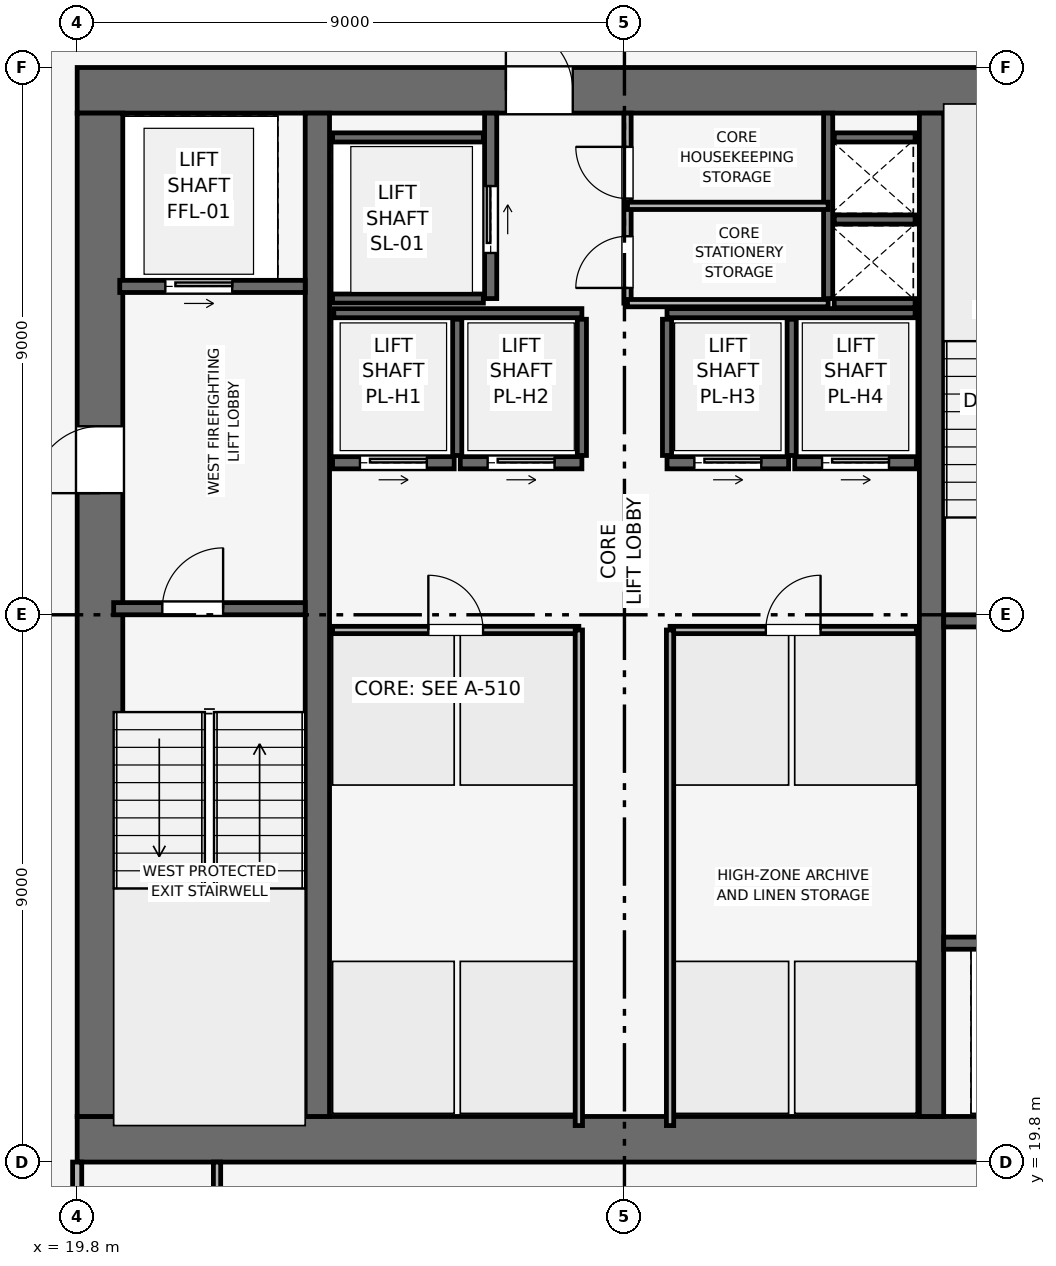
"""IFC4 building model, lengths in metres.
Left out: names, types, materials, properties, quantities, classifications, styles, units other than length and angle.
Written with IfcOpenShell. Run it as: python <this file> out.ifc"""

import sys

from ifc_helpers import new_model, si_unit, direction, frame, frame_2d, origin, place, context, subcontext, project, spatial, rectangle, extrude, element, fill, save


model = new_model("IFC4")
c1 = context("Model", 3, precision=1e-05, world=origin(), true_north=direction((0.0, 1.0)))
c2 = subcontext(c1, "Body", "Model", "MODEL_VIEW")
j1 = project(units=[si_unit("LENGTHUNIT", "METRE"), si_unit("PLANEANGLEUNIT", "RADIAN")], contexts=[c1])
p1 = place(None, origin())
s1 = spatial("IfcSite", under=j1, at=p1, CompositionType="ELEMENT")
p2 = place(p1, origin())
s2 = spatial("IfcBuilding", under=s1, at=p2, CompositionType="ELEMENT")
p3 = place(p2, frame((0.0, 0.0, 269.1)))
s3 = spatial("IfcBuildingStorey", under=s2, at=p3, CompositionType="ELEMENT", Elevation=269.1)
p4 = place(p3, frame((19.8, 20.175, 0.0), z_axis=(0.0, 0.0, 1.0), x_axis=(1.0, 0.0, 0.0)))
e1 = element("IfcWall", 1, at=p4, inside=s3, PredefinedType="SHEAR", context=c2, shape_type="SweptSolid", body=[
    extrude(rectangle(XDim=18.0, YDim=0.75, at=frame_2d((9.0, 0.0))), origin(), (0.0, 0.0, 1.0), 3.75),
])
p5 = place(p3, frame((19.8, 37.425, 0.0), z_axis=(0.0, 0.0, 1.0), x_axis=(1.0, 0.0, 0.0)))
e2 = element("IfcWall", 2, at=p5, inside=s3, PredefinedType="SHEAR", context=c2, shape_type="SweptSolid", body=[
    extrude(rectangle(XDim=18.0, YDim=0.75, at=frame_2d((9.0, 0.0))), origin(), (0.0, 0.0, 1.0), 3.75),
])
p6 = place(p5, frame((7.05, 0.0, 0.0)))
e3 = element("IfcOpeningElement", 3, at=p6, cuts=e2, PredefinedType="OPENING", context=c2, shape_type="SweptSolid", body=[
    extrude(rectangle(XDim=1.1, YDim=2.15, at=frame_2d((0.55, 1.075))), frame((0.0, 0.385, 0.0), z_axis=(0.0, -1.0, 0.0), x_axis=(1.0, 0.0, 0.0)), (0.0, 0.0, 1.0), 0.77),
])
p7 = place(p3, frame((20.175, 20.55, 0.0), z_axis=(0.0, 0.0, 1.0), x_axis=(0.0, 1.0, 0.0)))
e4 = element("IfcWall", 4, at=p7, inside=s3, PredefinedType="SHEAR", context=c2, shape_type="SweptSolid", body=[
    extrude(rectangle(XDim=16.5, YDim=0.75, at=frame_2d((8.25, 0.0))), origin(), (0.0, 0.0, 1.0), 3.75),
])
p8 = place(p7, frame((10.25, 0.0, 0.0)))
e5 = element("IfcOpeningElement", 5, at=p8, cuts=e4, PredefinedType="OPENING", context=c2, shape_type="SweptSolid", body=[
    extrude(rectangle(XDim=1.1, YDim=2.15, at=frame_2d((0.55, 1.075))), frame((0.0, 0.385, 0.0), z_axis=(0.0, -1.0, 0.0), x_axis=(1.0, 0.0, 0.0)), (0.0, 0.0, 1.0), 0.77),
])
for number, where, z_axis, x_axis in (
    (6, (23.75, 20.55, 0.0), (0.0, 0.0, 1.0), (0.0, 1.0, 0.0)),
    (7, (33.85, 20.55, 0.0), (0.0, 0.0, 1.0), (0.0, 1.0, 0.0)),
):
    element("IfcWall", number, at=place(p3, frame(where, z_axis=z_axis, x_axis=x_axis)), inside=s3, PredefinedType="SHEAR", context=c2, shape_type="SweptSolid", body=[
        extrude(rectangle(XDim=16.5, YDim=0.4, at=frame_2d((8.25, 0.0))), origin(), (0.0, 0.0, 1.0), 3.75),
    ])
p9 = place(p3, frame((20.4, 28.9, 0.0), z_axis=(0.0, 0.0, 1.0), x_axis=(1.0, 0.0, 0.0)))
e8 = element("IfcWall", 8, at=p9, inside=s3, PredefinedType="SHEAR", context=c2, shape_type="SweptSolid", body=[
    extrude(rectangle(XDim=3.15, YDim=0.2, at=frame_2d((1.575, 0.0))), origin(), (0.0, 0.0, 1.0), 3.5),
])
p10 = place(p9, frame((0.8, 0.0, 0.0)))
e9 = element("IfcOpeningElement", 9, at=p10, cuts=e8, PredefinedType="OPENING", context=c2, shape_type="SweptSolid", body=[
    extrude(rectangle(XDim=1.0, YDim=2.1, at=frame_2d((0.5, 1.05))), frame((0.0, 0.11, 0.0), z_axis=(0.0, -1.0, 0.0), x_axis=(1.0, 0.0, 0.0)), (0.0, 0.0, 1.0), 0.22),
])
p11 = place(p3, frame((34.05, 28.7, 0.0), z_axis=(0.0, 0.0, 1.0), x_axis=(1.0, 0.0, 0.0)))
e10 = element("IfcWall", 10, at=p11, inside=s3, PredefinedType="SHEAR", context=c2, shape_type="SweptSolid", body=[
    extrude(rectangle(XDim=3.15, YDim=0.2, at=frame_2d((1.575, 0.0))), origin(), (0.0, 0.0, 1.0), 3.5),
])
p12 = place(p11, frame((0.8, 0.0, 0.0)))
e11 = element("IfcOpeningElement", 11, at=p12, cuts=e10, PredefinedType="OPENING", context=c2, shape_type="SweptSolid", body=[
    extrude(rectangle(XDim=1.0, YDim=2.1, at=frame_2d((0.5, 1.05))), frame((0.0, 0.11, 0.0), z_axis=(0.0, -1.0, 0.0), x_axis=(1.0, 0.0, 0.0)), (0.0, 0.0, 1.0), 0.22),
])
p13 = place(p3, frame((32.15, 34.0, 0.0), z_axis=(0.0, 0.0, 1.0), x_axis=(0.0, 1.0, 0.0)))
e12 = element("IfcWall", 12, at=p13, inside=s3, PredefinedType="SHEAR", context=c2, shape_type="SweptSolid", body=[
    extrude(rectangle(XDim=3.05, YDim=0.15, at=frame_2d((1.525, 0.0))), origin(), (0.0, 0.0, 1.0), 3.5),
])
for number, where, z_axis, x_axis in (
    (13, (32.25, 33.925, 0.0), (0.0, 0.0, 1.0), (1.0, 0.0, 0.0)),
    (14, (32.25, 35.3, 0.0), (0.0, 0.0, 1.0), (1.0, 0.0, 0.0)),
):
    element("IfcWall", number, at=place(p3, frame(where, z_axis=z_axis, x_axis=x_axis)), inside=s3, PredefinedType="SHEAR", context=c2, shape_type="SweptSolid", body=[
        extrude(rectangle(XDim=1.33, YDim=0.15, at=frame_2d((0.665, 0.0))), origin(), (0.0, 0.0, 1.0), 3.5),
    ])
p14 = place(p3, frame((20.5, 34.2, 0.0), z_axis=(0.0, 0.0, 1.0), x_axis=(1.0, 0.0, 0.0)))
e15 = element("IfcWall", 15, at=p14, inside=s3, PredefinedType="SHEAR", context=c2, shape_type="SweptSolid", body=[
    extrude(rectangle(XDim=3.05, YDim=0.2, at=frame_2d((1.525, 0.0))), origin(), (0.0, 0.0, 1.0), 3.5),
])
p15 = place(p14, frame((0.75, 0.0, 0.0)))
e16 = element("IfcOpeningElement", 16, at=p15, cuts=e15, PredefinedType="OPENING", context=c2, shape_type="SweptSolid", body=[
    extrude(rectangle(XDim=1.1, YDim=2.15, at=frame_2d((0.55, 1.075))), frame((0.0, 0.11, 0.0), z_axis=(0.0, -1.0, 0.0), x_axis=(1.0, 0.0, 0.0)), (0.0, 0.0, 1.0), 0.22),
])
p16 = place(p3, frame((34.05, 23.4, 0.0), z_axis=(0.0, 0.0, 1.0), x_axis=(1.0, 0.0, 0.0)))
e17 = element("IfcWall", 17, at=p16, inside=s3, PredefinedType="SHEAR", context=c2, shape_type="SweptSolid", body=[
    extrude(rectangle(XDim=3.05, YDim=0.2, at=frame_2d((1.525, 0.0))), origin(), (0.0, 0.0, 1.0), 3.5),
])
p17 = place(p16, frame((1.2, 0.0, 0.0)))
e18 = element("IfcOpeningElement", 18, at=p17, cuts=e17, PredefinedType="OPENING", context=c2, shape_type="SweptSolid", body=[
    extrude(rectangle(XDim=1.1, YDim=2.15, at=frame_2d((0.55, 1.075))), frame((0.0, 0.11, 0.0), z_axis=(0.0, -1.0, 0.0), x_axis=(1.0, 0.0, 0.0)), (0.0, 0.0, 1.0), 0.22),
])
p18 = place(p3, frame((26.6, 34.0, 0.0), z_axis=(0.0, 0.0, 1.0), x_axis=(0.0, 1.0, 0.0)))
e19 = element("IfcWall", 19, at=p18, inside=s3, PredefinedType="SHEAR", context=c2, shape_type="SweptSolid", body=[
    extrude(rectangle(XDim=3.05, YDim=0.2, at=frame_2d((1.525, 0.0))), origin(), (0.0, 0.0, 1.0), 3.5),
])
p19 = place(p18, frame((0.75, 0.0, 0.0)))
e20 = element("IfcOpeningElement", 20, at=p19, cuts=e19, PredefinedType="OPENING", context=c2, shape_type="SweptSolid", body=[
    extrude(rectangle(XDim=1.1, YDim=2.15, at=frame_2d((0.55, 1.075))), frame((0.0, 0.11, 0.0), z_axis=(0.0, -1.0, 0.0), x_axis=(1.0, 0.0, 0.0)), (0.0, 0.0, 1.0), 0.22),
])
for number, where, z_axis, x_axis in (
    (21, (24.0, 34.0, 0.0), (0.0, 0.0, 1.0), (1.0, 0.0, 0.0)),
    (22, (24.0, 36.65, 0.0), (0.0, 0.0, 1.0), (1.0, 0.0, 0.0)),
):
    element("IfcWall", number, at=place(p3, frame(where, z_axis=z_axis, x_axis=x_axis)), inside=s3, PredefinedType="SHEAR", context=c2, shape_type="SweptSolid", body=[
        extrude(rectangle(XDim=2.48, YDim=0.15, at=frame_2d((1.24, 0.0))), origin(), (0.0, 0.0, 1.0), 3.5),
    ])
p20 = place(p3, frame((24.0, 31.3, 0.0), z_axis=(0.0, 0.0, 1.0), x_axis=(1.0, 0.0, 0.0)))
e23 = element("IfcWall", 23, at=p20, inside=s3, PredefinedType="SHEAR", context=c2, shape_type="SweptSolid", body=[
    extrude(rectangle(XDim=2.0, YDim=0.2, at=frame_2d((1.0, 0.0))), origin(), (0.0, 0.0, 1.0), 3.5),
])
p21 = place(p20, frame((0.45, 0.0, 0.0)))
e24 = element("IfcOpeningElement", 24, at=p21, cuts=e23, PredefinedType="OPENING", context=c2, shape_type="SweptSolid", body=[
    extrude(rectangle(XDim=1.1, YDim=2.15, at=frame_2d((0.55, 1.075))), frame((0.0, 0.11, 0.0), z_axis=(0.0, -1.0, 0.0), x_axis=(1.0, 0.0, 0.0)), (0.0, 0.0, 1.0), 0.22),
])
p22 = place(p3, frame((26.1, 31.3, 0.0), z_axis=(0.0, 0.0, 1.0), x_axis=(1.0, 0.0, 0.0)))
e25 = element("IfcWall", 25, at=p22, inside=s3, PredefinedType="SHEAR", context=c2, shape_type="SweptSolid", body=[
    extrude(rectangle(XDim=2.0, YDim=0.2, at=frame_2d((1.0, 0.0))), origin(), (0.0, 0.0, 1.0), 3.5),
])
p23 = place(p22, frame((0.45, 0.0, 0.0)))
e26 = element("IfcOpeningElement", 26, at=p23, cuts=e25, PredefinedType="OPENING", context=c2, shape_type="SweptSolid", body=[
    extrude(rectangle(XDim=1.1, YDim=2.15, at=frame_2d((0.55, 1.075))), frame((0.0, 0.11, 0.0), z_axis=(0.0, -1.0, 0.0), x_axis=(1.0, 0.0, 0.0)), (0.0, 0.0, 1.0), 0.22),
])
p24 = place(p3, frame((29.5, 31.3, 0.0), z_axis=(0.0, 0.0, 1.0), x_axis=(1.0, 0.0, 0.0)))
e27 = element("IfcWall", 27, at=p24, inside=s3, PredefinedType="SHEAR", context=c2, shape_type="SweptSolid", body=[
    extrude(rectangle(XDim=2.0, YDim=0.2, at=frame_2d((1.0, 0.0))), origin(), (0.0, 0.0, 1.0), 3.5),
])
p25 = place(p24, frame((0.45, 0.0, 0.0)))
e28 = element("IfcOpeningElement", 28, at=p25, cuts=e27, PredefinedType="OPENING", context=c2, shape_type="SweptSolid", body=[
    extrude(rectangle(XDim=1.1, YDim=2.15, at=frame_2d((0.55, 1.075))), frame((0.0, 0.11, 0.0), z_axis=(0.0, -1.0, 0.0), x_axis=(1.0, 0.0, 0.0)), (0.0, 0.0, 1.0), 0.22),
])
p26 = place(p3, frame((31.6, 31.3, 0.0), z_axis=(0.0, 0.0, 1.0), x_axis=(1.0, 0.0, 0.0)))
e29 = element("IfcWall", 29, at=p26, inside=s3, PredefinedType="SHEAR", context=c2, shape_type="SweptSolid", body=[
    extrude(rectangle(XDim=2.0, YDim=0.2, at=frame_2d((1.0, 0.0))), origin(), (0.0, 0.0, 1.0), 3.5),
])
p27 = place(p26, frame((0.45, 0.0, 0.0)))
e30 = element("IfcOpeningElement", 30, at=p27, cuts=e29, PredefinedType="OPENING", context=c2, shape_type="SweptSolid", body=[
    extrude(rectangle(XDim=1.1, YDim=2.15, at=frame_2d((0.55, 1.075))), frame((0.0, 0.11, 0.0), z_axis=(0.0, -1.0, 0.0), x_axis=(1.0, 0.0, 0.0)), (0.0, 0.0, 1.0), 0.22),
])
p28 = place(p3, frame((32.25, 36.65, 0.0), z_axis=(0.0, 0.0, 1.0), x_axis=(1.0, 0.0, 0.0)))
e31 = element("IfcWall", 31, at=p28, inside=s3, PredefinedType="SHEAR", context=c2, shape_type="SweptSolid", body=[
    extrude(rectangle(XDim=1.33, YDim=0.15, at=frame_2d((0.665, 0.0))), origin(), (0.0, 0.0, 1.0), 3.5),
])
for number, where, z_axis, x_axis in (
    (32, (24.02, 33.76, 0.0), (0.0, 0.0, 1.0), (1.0, 0.0, 0.0)),
    (33, (29.5, 33.76, 0.0), (0.0, 0.0, 1.0), (1.0, 0.0, 0.0)),
):
    element("IfcWall", number, at=place(p3, frame(where, z_axis=z_axis, x_axis=x_axis)), inside=s3, PredefinedType="SHEAR", context=c2, shape_type="SweptSolid", body=[
        extrude(rectangle(XDim=4.08, YDim=0.15, at=frame_2d((2.04, 0.0))), origin(), (0.0, 0.0, 1.0), 3.5),
    ])
for number, where, z_axis, x_axis in (
    (34, (26.05, 31.42, 0.0), (0.0, 0.0, 1.0), (0.0, 1.0, 0.0)),
    (35, (28.1, 31.42, 0.0), (0.0, 0.0, 1.0), (0.0, 1.0, 0.0)),
    (36, (29.5, 31.42, 0.0), (0.0, 0.0, 1.0), (0.0, 1.0, 0.0)),
    (37, (31.55, 31.42, 0.0), (0.0, 0.0, 1.0), (0.0, 1.0, 0.0)),
):
    element("IfcWall", number, at=place(p3, frame(where, z_axis=z_axis, x_axis=x_axis)), inside=s3, PredefinedType="SHEAR", context=c2, shape_type="SweptSolid", body=[
        extrude(rectangle(XDim=2.24, YDim=0.15, at=frame_2d((1.12, 0.0))), origin(), (0.0, 0.0, 1.0), 3.5),
    ])
p29 = place(p3, frame((28.85, 33.925, 0.0), z_axis=(0.0, 0.0, 1.0), x_axis=(0.0, 1.0, 0.0)))
e38 = element("IfcWall", 38, at=p29, inside=s3, PredefinedType="PARTITIONING", context=c2, shape_type="SweptSolid", body=[
    extrude(rectangle(XDim=3.125, YDim=0.12, at=frame_2d((1.562, 0.0))), origin(), (0.0, 0.0, 1.0), 3.5),
])
p30 = place(p29, frame((0.25, 0.0, 0.0)))
e39 = element("IfcOpeningElement", 39, at=p30, cuts=e38, PredefinedType="OPENING", context=c2, shape_type="SweptSolid", body=[
    extrude(rectangle(XDim=0.85, YDim=2.1, at=frame_2d((0.425, 1.05))), frame((0.0, 0.07, 0.0), z_axis=(0.0, -1.0, 0.0), x_axis=(1.0, 0.0, 0.0)), (0.0, 0.0, 1.0), 0.14),
])
p31 = place(p29, frame((1.72, 0.0, 0.0)))
e40 = element("IfcOpeningElement", 40, at=p31, cuts=e38, PredefinedType="OPENING", context=c2, shape_type="SweptSolid", body=[
    extrude(rectangle(XDim=0.85, YDim=2.1, at=frame_2d((0.425, 1.05))), frame((0.0, 0.07, 0.0), z_axis=(0.0, -1.0, 0.0), x_axis=(1.0, 0.0, 0.0)), (0.0, 0.0, 1.0), 0.14),
])
for number, where, z_axis, x_axis in (
    (41, (28.85, 35.525, 0.0), (0.0, 0.0, 1.0), (1.0, 0.0, 0.0)),
    (42, (28.85, 33.925, 0.0), (0.0, 0.0, 1.0), (1.0, 0.0, 0.0)),
):
    element("IfcWall", number, at=place(p3, frame(where, z_axis=z_axis, x_axis=x_axis)), inside=s3, PredefinedType="PARTITIONING", context=c2, shape_type="SweptSolid", body=[
        extrude(rectangle(XDim=3.3, YDim=0.12, at=frame_2d((1.65, 0.0))), origin(), (0.0, 0.0, 1.0), 3.5),
    ])
p32 = place(p3, frame((24.0, 28.55, 0.0), z_axis=(0.0, 0.0, 1.0), x_axis=(1.0, 0.0, 0.0)))
e43 = element("IfcWall", 43, at=p32, inside=s3, PredefinedType="PARTITIONING", context=c2, shape_type="SweptSolid", body=[
    extrude(rectangle(XDim=4.05, YDim=0.12, at=frame_2d((2.025, 0.0))), origin(), (0.0, 0.0, 1.0), 3.5),
])
p33 = place(p32, frame((1.575, 0.0, 0.0)))
e44 = element("IfcOpeningElement", 44, at=p33, cuts=e43, PredefinedType="OPENING", context=c2, shape_type="SweptSolid", body=[
    extrude(rectangle(XDim=0.9, YDim=2.1, at=frame_2d((0.45, 1.05))), frame((0.0, 0.07, 0.0), z_axis=(0.0, -1.0, 0.0), x_axis=(1.0, 0.0, 0.0)), (0.0, 0.0, 1.0), 0.14),
])
p34 = place(p3, frame((28.05, 20.4, 0.0), z_axis=(0.0, 0.0, 1.0), x_axis=(0.0, 1.0, 0.0)))
e45 = element("IfcWall", 45, at=p34, inside=s3, PredefinedType="PARTITIONING", context=c2, shape_type="SweptSolid", body=[
    extrude(rectangle(XDim=8.15, YDim=0.12, at=frame_2d((4.075, 0.0))), origin(), (0.0, 0.0, 1.0), 3.5),
])
p35 = place(p3, frame((29.55, 28.55, 0.0), z_axis=(0.0, 0.0, 1.0), x_axis=(1.0, 0.0, 0.0)))
e46 = element("IfcWall", 46, at=p35, inside=s3, PredefinedType="PARTITIONING", context=c2, shape_type="SweptSolid", body=[
    extrude(rectangle(XDim=4.05, YDim=0.12, at=frame_2d((2.025, 0.0))), origin(), (0.0, 0.0, 1.0), 3.5),
])
p36 = place(p35, frame((1.575, 0.0, 0.0)))
e47 = element("IfcOpeningElement", 47, at=p36, cuts=e46, PredefinedType="OPENING", context=c2, shape_type="SweptSolid", body=[
    extrude(rectangle(XDim=0.9, YDim=2.1, at=frame_2d((0.45, 1.05))), frame((0.0, 0.07, 0.0), z_axis=(0.0, -1.0, 0.0), x_axis=(1.0, 0.0, 0.0)), (0.0, 0.0, 1.0), 0.14),
])
p37 = place(p3, frame((29.55, 20.4, 0.0), z_axis=(0.0, 0.0, 1.0), x_axis=(0.0, 1.0, 0.0)))
e48 = element("IfcWall", 48, at=p37, inside=s3, PredefinedType="PARTITIONING", context=c2, shape_type="SweptSolid", body=[
    extrude(rectangle(XDim=8.15, YDim=0.12, at=frame_2d((4.075, 0.0))), origin(), (0.0, 0.0, 1.0), 3.5),
])
p38 = place(p3, frame((19.8, 4.03, 0.0), z_axis=(0.0, 0.0, 1.0), x_axis=(0.0, 1.0, 0.0)))
e49 = element("IfcWall", 49, at=p38, inside=s3, PredefinedType="PARTITIONING", context=c2, shape_type="SweptSolid", body=[
    extrude(rectangle(XDim=15.77, YDim=0.15, at=frame_2d((7.885, 0.0))), origin(), (0.0, 0.0, 1.0), 3.085),
])
p39 = place(p38, frame((10.82, 0.0, 0.0)))
e50 = element("IfcOpeningElement", 50, at=p39, cuts=e49, PredefinedType="OPENING", context=c2, shape_type="SweptSolid", body=[
    extrude(rectangle(XDim=0.9, YDim=2.1, at=frame_2d((0.45, 1.05))), frame((0.0, 0.085, 0.0), z_axis=(0.0, -1.0, 0.0), x_axis=(1.0, 0.0, 0.0)), (0.0, 0.0, 1.0), 0.17),
])
p40 = place(p3, frame((22.1, 4.03, 0.0), z_axis=(0.0, 0.0, 1.0), x_axis=(0.0, 1.0, 0.0)))
e51 = element("IfcWall", 51, at=p40, inside=s3, PredefinedType="PARTITIONING", context=c2, shape_type="SweptSolid", body=[
    extrude(rectangle(XDim=15.77, YDim=0.12, at=frame_2d((7.885, 0.0))), origin(), (0.0, 0.0, 1.0), 3.085),
])
p41 = place(p40, frame((13.37, 0.0, 0.0)))
e52 = element("IfcOpeningElement", 52, at=p41, cuts=e51, PredefinedType="OPENING", context=c2, shape_type="SweptSolid", body=[
    extrude(rectangle(XDim=0.9, YDim=2.1, at=frame_2d((0.45, 1.05))), frame((0.0, 0.07, 0.0), z_axis=(0.0, -1.0, 0.0), x_axis=(1.0, 0.0, 0.0)), (0.0, 0.0, 1.0), 0.14),
])
p42 = place(p10, origin())
e53 = element("IfcDoor", 53, at=p42, inside=s3, OperationType="SINGLE_SWING_RIGHT", PredefinedType="DOOR", context=c2, shape_type="SweptSolid", body=[
    extrude(rectangle(XDim=1.0, YDim=2.1, at=frame_2d((0.5, 1.05))), frame((0.0, 0.025, 0.0), z_axis=(0.0, -1.0, 0.0), x_axis=(1.0, 0.0, 0.0)), (0.0, 0.0, 1.0), 0.05),
])
fill(e9, e53)
p43 = place(p15, origin())
e54 = element("IfcDoor", 54, at=p43, inside=s3, OperationType="SLIDING_TO_RIGHT", PredefinedType="DOOR", context=c2, shape_type="SweptSolid", body=[
    extrude(rectangle(XDim=1.1, YDim=2.15, at=frame_2d((0.55, 1.075))), frame((0.0, 0.025, 0.0), z_axis=(0.0, -1.0, 0.0), x_axis=(1.0, 0.0, 0.0)), (0.0, 0.0, 1.0), 0.05),
])
fill(e16, e54)
p44 = place(p19, origin())
e55 = element("IfcDoor", 55, at=p44, inside=s3, OperationType="SLIDING_TO_RIGHT", PredefinedType="DOOR", context=c2, shape_type="SweptSolid", body=[
    extrude(rectangle(XDim=1.1, YDim=2.15, at=frame_2d((0.55, 1.075))), frame((0.0, 0.025, 0.0), z_axis=(0.0, -1.0, 0.0), x_axis=(1.0, 0.0, 0.0)), (0.0, 0.0, 1.0), 0.05),
])
fill(e20, e55)
p45 = place(p21, origin())
e56 = element("IfcDoor", 56, at=p45, inside=s3, OperationType="SLIDING_TO_RIGHT", PredefinedType="DOOR", context=c2, shape_type="SweptSolid", body=[
    extrude(rectangle(XDim=1.1, YDim=2.15, at=frame_2d((0.55, 1.075))), frame((0.0, 0.025, 0.0), z_axis=(0.0, -1.0, 0.0), x_axis=(1.0, 0.0, 0.0)), (0.0, 0.0, 1.0), 0.05),
])
fill(e24, e56)
p46 = place(p23, origin())
e57 = element("IfcDoor", 57, at=p46, inside=s3, OperationType="SLIDING_TO_RIGHT", PredefinedType="DOOR", context=c2, shape_type="SweptSolid", body=[
    extrude(rectangle(XDim=1.1, YDim=2.15, at=frame_2d((0.55, 1.075))), frame((0.0, 0.025, 0.0), z_axis=(0.0, -1.0, 0.0), x_axis=(1.0, 0.0, 0.0)), (0.0, 0.0, 1.0), 0.05),
])
fill(e26, e57)
p47 = place(p25, origin())
e58 = element("IfcDoor", 58, at=p47, inside=s3, OperationType="SLIDING_TO_RIGHT", PredefinedType="DOOR", context=c2, shape_type="SweptSolid", body=[
    extrude(rectangle(XDim=1.1, YDim=2.15, at=frame_2d((0.55, 1.075))), frame((0.0, 0.025, 0.0), z_axis=(0.0, -1.0, 0.0), x_axis=(1.0, 0.0, 0.0)), (0.0, 0.0, 1.0), 0.05),
])
fill(e28, e58)
p48 = place(p27, origin())
e59 = element("IfcDoor", 59, at=p48, inside=s3, OperationType="SLIDING_TO_RIGHT", PredefinedType="DOOR", context=c2, shape_type="SweptSolid", body=[
    extrude(rectangle(XDim=1.1, YDim=2.15, at=frame_2d((0.55, 1.075))), frame((0.0, 0.025, 0.0), z_axis=(0.0, -1.0, 0.0), x_axis=(1.0, 0.0, 0.0)), (0.0, 0.0, 1.0), 0.05),
])
fill(e30, e59)
p49 = place(p30, origin())
e60 = element("IfcDoor", 60, at=p49, inside=s3, OperationType="SINGLE_SWING_LEFT", PredefinedType="DOOR", context=c2, shape_type="SweptSolid", body=[
    extrude(rectangle(XDim=0.85, YDim=2.1, at=frame_2d((0.425, 1.05))), frame((0.0, 0.025, 0.0), z_axis=(0.0, -1.0, 0.0), x_axis=(1.0, 0.0, 0.0)), (0.0, 0.0, 1.0), 0.05),
])
fill(e39, e60)
p50 = place(p31, origin())
e61 = element("IfcDoor", 61, at=p50, inside=s3, OperationType="SINGLE_SWING_RIGHT", PredefinedType="DOOR", context=c2, shape_type="SweptSolid", body=[
    extrude(rectangle(XDim=0.85, YDim=2.1, at=frame_2d((0.425, 1.05))), frame((0.0, 0.025, 0.0), z_axis=(0.0, -1.0, 0.0), x_axis=(1.0, 0.0, 0.0)), (0.0, 0.0, 1.0), 0.05),
])
fill(e40, e61)
p51 = place(p33, origin())
e62 = element("IfcDoor", 62, at=p51, inside=s3, OperationType="SINGLE_SWING_LEFT", PredefinedType="DOOR", context=c2, shape_type="SweptSolid", body=[
    extrude(rectangle(XDim=0.9, YDim=2.1, at=frame_2d((0.45, 1.05))), frame((0.0, 0.025, 0.0), z_axis=(0.0, -1.0, 0.0), x_axis=(1.0, 0.0, 0.0)), (0.0, 0.0, 1.0), 0.05),
])
fill(e44, e62)
p52 = place(p36, origin())
e63 = element("IfcDoor", 63, at=p52, inside=s3, OperationType="SINGLE_SWING_RIGHT", PredefinedType="DOOR", context=c2, shape_type="SweptSolid", body=[
    extrude(rectangle(XDim=0.9, YDim=2.1, at=frame_2d((0.45, 1.05))), frame((0.0, 0.025, 0.0), z_axis=(0.0, -1.0, 0.0), x_axis=(1.0, 0.0, 0.0)), (0.0, 0.0, 1.0), 0.05),
])
fill(e47, e63)
p53 = place(p8, origin())
e64 = element("IfcDoor", 64, at=p53, inside=s3, OperationType="SINGLE_SWING_LEFT", PredefinedType="DOOR", context=c2, shape_type="SweptSolid", body=[
    extrude(rectangle(XDim=1.1, YDim=2.15, at=frame_2d((0.55, 1.075))), frame((0.0, 0.025, 0.0), z_axis=(0.0, -1.0, 0.0), x_axis=(1.0, 0.0, 0.0)), (0.0, 0.0, 1.0), 0.05),
])
fill(e5, e64)
p54 = place(p6, origin())
e65 = element("IfcDoor", 65, at=p54, inside=s3, OperationType="SINGLE_SWING_LEFT", PredefinedType="DOOR", context=c2, shape_type="SweptSolid", body=[
    extrude(rectangle(XDim=1.1, YDim=2.15, at=frame_2d((0.55, 1.075))), frame((0.0, 0.025, 0.0), z_axis=(0.0, -1.0, 0.0), x_axis=(1.0, 0.0, 0.0)), (0.0, 0.0, 1.0), 0.05),
])
fill(e3, e65)
save(model, sys.argv[1])
